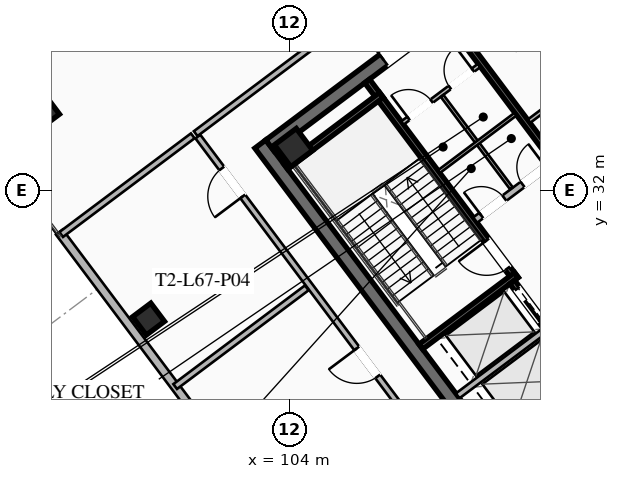
"""IFC4 building model, lengths in metres.
Left out: names, types, materials, properties, quantities, classifications, styles, units other than length and angle.
Written with IfcOpenShell. Run it as: python <this file> out.ifc"""

import sys

from ifc_helpers import new_model, si_unit, direction, frame, frame_2d, origin, origin_2d, place, context, subcontext, project, spatial, rectangle, hollow_rectangle, extrude, element, fill, save


model = new_model("IFC4")
c1 = context("Model", 3, precision=1e-05, world=origin(), true_north=direction((0.0, 1.0)))
c2 = subcontext(c1, "Body", "Model", "MODEL_VIEW")
j1 = project(units=[si_unit("LENGTHUNIT", "METRE"), si_unit("PLANEANGLEUNIT", "RADIAN")], contexts=[c1])
p1 = place(None, origin())
s1 = spatial("IfcSite", under=j1, at=p1, CompositionType="ELEMENT")
p2 = place(p1, origin())
s2 = spatial("IfcBuilding", under=s1, at=p2, CompositionType="ELEMENT")
p3 = place(p2, frame((0.0, 0.0, 246.8)))
s3 = spatial("IfcBuildingStorey", under=s2, at=p3, CompositionType="ELEMENT", Elevation=246.8)
p4 = place(p3, frame((112.396, 21.047, 0.0), z_axis=(0.0, 0.0, 1.0), x_axis=(-0.600005007985, 0.799996243986, 0.0)))
e1 = element("IfcWall", 1, at=p4, inside=s3, PredefinedType="SHEAR", context=c2, shape_type="SweptSolid", body=[
    extrude(rectangle(XDim=15.6, YDim=0.45, at=frame_2d((7.8, 0.0))), origin(), (0.0, 0.0, 1.0), 4.6),
])
p5 = place(p3, frame((103.351, 33.482, 0.0), z_axis=(0.0, 0.0, 1.0), x_axis=(0.8, 0.6, 0.0)))
e2 = element("IfcWall", 2, at=p5, inside=s3, PredefinedType="SHEAR", context=c2, shape_type="SweptSolid", body=[
    extrude(rectangle(XDim=15.26, YDim=0.45, at=frame_2d((7.63, 0.0))), origin(), (0.0, 0.0, 1.0), 4.6),
])
p6 = place(p5, frame((4.68, 0.0, 0.0)))
e3 = element("IfcOpeningElement", 3, at=p6, cuts=e2, PredefinedType="OPENING", context=c2, shape_type="SweptSolid", body=[
    extrude(rectangle(XDim=1.25, YDim=2.25, at=frame_2d((0.625, 1.125))), frame((0.0, 0.235, 0.0), z_axis=(0.0, -1.0, 0.0), x_axis=(1.0, 0.0, 0.0)), (0.0, 0.0, 1.0), 0.47),
])
p7 = place(p5, frame((9.73, 0.0, 0.0)))
e4 = element("IfcOpeningElement", 4, at=p7, cuts=e2, PredefinedType="OPENING", context=c2, shape_type="SweptSolid", body=[
    extrude(rectangle(XDim=1.25, YDim=2.25, at=frame_2d((0.625, 1.125))), frame((0.0, 0.235, 0.0), z_axis=(0.0, -1.0, 0.0), x_axis=(1.0, 0.0, 0.0)), (0.0, 0.0, 1.0), 0.47),
])
for number, where, z_axis, x_axis in (
    (5, (104.13, 33.41, 0.0), (0.0, 0.0, 1.0), (0.8, 0.6, 0.0)),
    (6, (95.8, 34.6, 0.0), (0.0, 0.0, 1.0), (0.8, 0.6, 0.0)),
):
    element("IfcColumn", number, at=place(p3, frame(where, z_axis=z_axis, x_axis=x_axis)), inside=s3, PredefinedType="COLUMN", context=c2, shape_type="SweptSolid", body=[
        extrude(hollow_rectangle(XDim=0.9, YDim=0.9, WallThickness=0.04, at=origin_2d()), origin(), (0.0, 0.0, 1.0), 4.38),
    ])
p8 = place(p3, frame((99.36, 27.77, 0.0), z_axis=(0.0, 0.0, 1.0), x_axis=(0.799999996291, 0.600000004945, 0.0)))
e7 = element("IfcColumn", 7, at=p8, inside=s3, PredefinedType="COLUMN", context=c2, shape_type="SweptSolid", body=[
    extrude(hollow_rectangle(XDim=0.75, YDim=0.75, WallThickness=0.032, at=origin_2d()), origin(), (0.0, 0.0, 1.0), 4.38),
])
p9 = place(p3, frame((107.766, 15.512, 0.0), z_axis=(0.0, 0.0, 1.0), x_axis=(-0.6, 0.8, 0.0)))
e8 = element("IfcWall", 8, at=p9, inside=s3, PredefinedType="SOLIDWALL", context=c2, shape_type="SweptSolid", body=[
    extrude(rectangle(XDim=18.9, YDim=0.28, at=frame_2d((9.45, 0.0))), origin(), (0.0, 0.0, 1.0), 4.38),
])
p10 = place(p3, frame((111.44, 29.08, 0.0), z_axis=(0.0, 0.0, 1.0), x_axis=(-0.59999041401, 0.800007189403, 0.0)))
e9 = element("IfcWall", 9, at=p10, inside=s3, PredefinedType="SHEAR", context=c2, shape_type="SweptSolid", body=[
    extrude(rectangle(XDim=8.15, YDim=0.2, at=frame_2d((4.075, 0.0))), origin(), (0.0, 0.0, 1.0), 4.38),
])
p11 = place(p10, frame((0.45, 0.0, 0.0)))
e10 = element("IfcOpeningElement", 10, at=p11, cuts=e9, PredefinedType="OPENING", context=c2, shape_type="SweptSolid", body=[
    extrude(rectangle(XDim=1.15, YDim=2.2, at=frame_2d((0.575, 1.1))), frame((0.0, 0.11, 0.0), z_axis=(0.0, -1.0, 0.0), x_axis=(1.0, 0.0, 0.0)), (0.0, 0.0, 1.0), 0.22),
])
for number, where, z_axis, x_axis in (
    (11, (108.316, 26.862, 0.0), (0.0, 0.0, 1.0), (0.8, 0.6, 0.0)),
    (12, (103.876, 32.782, 0.0), (0.0, 0.0, 1.0), (0.8, 0.6, 0.0)),
):
    element("IfcWall", number, at=place(p3, frame(where, z_axis=z_axis, x_axis=x_axis)), inside=s3, PredefinedType="SHEAR", context=c2, shape_type="SweptSolid", body=[
        extrude(rectangle(XDim=3.93, YDim=0.2, at=frame_2d((1.965, 0.0))), origin(), (0.0, 0.0, 1.0), 4.38),
    ])
p12 = place(p3, frame((118.058, 25.856, 0.0), z_axis=(0.0, 0.0, 1.0), x_axis=(-0.600002657301, 0.799998007018, 0.0)))
e13 = element("IfcWall", 13, at=p12, inside=s3, PredefinedType="SHEAR", context=c2, shape_type="SweptSolid", body=[
    extrude(rectangle(XDim=14.7, YDim=0.2, at=frame_2d((7.35, 0.0))), origin(), (0.0, 0.0, 1.0), 4.38),
])
p13 = place(p3, frame((110.104, 31.028, 0.0), z_axis=(0.0, 0.0, 1.0), x_axis=(0.800018601094, 0.59997519774, 0.0)))
e14 = element("IfcWall", 14, at=p13, inside=s3, PredefinedType="SOLIDWALL", context=c2, shape_type="SweptSolid", body=[
    extrude(rectangle(XDim=3.15, YDim=0.22, at=frame_2d((1.575, 0.0))), origin(), (0.0, 0.0, 1.0), 3.491),
])
p14 = place(p13, frame((0.25, 0.0, 0.0)))
e15 = element("IfcOpeningElement", 15, at=p14, cuts=e14, PredefinedType="OPENING", context=c2, shape_type="SweptSolid", body=[
    extrude(rectangle(XDim=0.95, YDim=2.05, at=frame_2d((0.475, 1.025))), frame((0.0, 0.12, 0.0), z_axis=(0.0, -1.0, 0.0), x_axis=(1.0, 0.0, 0.0)), (0.0, 0.0, 1.0), 0.24),
])
p15 = place(p13, frame((1.95, 0.0, 0.0)))
e16 = element("IfcOpeningElement", 16, at=p15, cuts=e14, PredefinedType="OPENING", context=c2, shape_type="SweptSolid", body=[
    extrude(rectangle(XDim=0.95, YDim=2.05, at=frame_2d((0.475, 1.025))), frame((0.0, 0.12, 0.0), z_axis=(0.0, -1.0, 0.0), x_axis=(1.0, 0.0, 0.0)), (0.0, 0.0, 1.0), 0.24),
])
p16 = place(p3, frame((115.25, 23.75, 0.0), z_axis=(0.0, 0.0, 1.0), x_axis=(-0.599994036198, 0.800004472816, 0.0)))
e17 = element("IfcWall", 17, at=p16, inside=s3, PredefinedType="SHEAR", context=c2, shape_type="SweptSolid", body=[
    extrude(rectangle(XDim=6.55, YDim=0.2, at=frame_2d((3.275, 0.0))), origin(), (0.0, 0.0, 1.0), 4.38),
])
p17 = place(p16, frame((4.975, 0.0, 0.0)))
e18 = element("IfcOpeningElement", 18, at=p17, cuts=e17, PredefinedType="OPENING", context=c2, shape_type="SweptSolid", body=[
    extrude(rectangle(XDim=1.3, YDim=2.25, at=frame_2d((0.65, 1.125))), frame((0.0, 0.11, 0.0), z_axis=(0.0, -1.0, 0.0), x_axis=(1.0, 0.0, 0.0)), (0.0, 0.0, 1.0), 0.22),
])
p18 = place(p16, frame((2.975, 0.0, 0.0)))
e19 = element("IfcOpeningElement", 19, at=p18, cuts=e17, PredefinedType="OPENING", context=c2, shape_type="SweptSolid", body=[
    extrude(rectangle(XDim=1.3, YDim=2.25, at=frame_2d((0.65, 1.125))), frame((0.0, 0.11, 0.0), z_axis=(0.0, -1.0, 0.0), x_axis=(1.0, 0.0, 0.0)), (0.0, 0.0, 1.0), 0.22),
])
p19 = place(p16, frame((0.775, 0.0, 0.0)))
e20 = element("IfcOpeningElement", 20, at=p19, cuts=e17, PredefinedType="OPENING", context=c2, shape_type="SweptSolid", body=[
    extrude(rectangle(XDim=1.3, YDim=2.25, at=frame_2d((0.65, 1.125))), frame((0.0, 0.11, 0.0), z_axis=(0.0, -1.0, 0.0), x_axis=(1.0, 0.0, 0.0)), (0.0, 0.0, 1.0), 0.22),
])
for number, where, z_axis, x_axis in (
    (21, (110.746, 23.622, 0.0), (0.0, 0.0, 1.0), (0.8, 0.6, 0.0)),
    (22, (109.528, 25.246, 0.0), (0.0, 0.0, 1.0), (0.8, 0.6, 0.0)),
):
    element("IfcWall", number, at=place(p3, frame(where, z_axis=z_axis, x_axis=x_axis)), inside=s3, PredefinedType="SOLIDWALL", context=c2, shape_type="SweptSolid", body=[
        extrude(rectangle(XDim=3.58, YDim=0.2, at=frame_2d((1.79, 0.0))), origin(), (0.0, 0.0, 1.0), 4.38),
    ])
p20 = place(p3, frame((107.71, 34.22, 0.0), z_axis=(0.0, 0.0, 1.0), x_axis=(0.799981399002, 0.60002480053, 0.0)))
e23 = element("IfcWall", 23, at=p20, inside=s3, PredefinedType="PARTITIONING", context=c2, shape_type="SweptSolid", body=[
    extrude(rectangle(XDim=3.15, YDim=0.135, at=frame_2d((1.575, 0.0))), origin(), (0.0, 0.0, 1.0), 3.491),
])
p21 = place(p20, frame((0.25, 0.0, 0.0)))
e24 = element("IfcOpeningElement", 24, at=p21, cuts=e23, PredefinedType="OPENING", context=c2, shape_type="SweptSolid", body=[
    extrude(rectangle(XDim=0.95, YDim=2.05, at=frame_2d((0.475, 1.025))), frame((0.0, 0.077, 0.0), z_axis=(0.0, -1.0, 0.0), x_axis=(1.0, 0.0, 0.0)), (0.0, 0.0, 1.0), 0.155),
])
p22 = place(p20, frame((1.95, 0.0, 0.0)))
e25 = element("IfcOpeningElement", 25, at=p22, cuts=e23, PredefinedType="OPENING", context=c2, shape_type="SweptSolid", body=[
    extrude(rectangle(XDim=0.95, YDim=2.05, at=frame_2d((0.475, 1.025))), frame((0.0, 0.077, 0.0), z_axis=(0.0, -1.0, 0.0), x_axis=(1.0, 0.0, 0.0)), (0.0, 0.0, 1.0), 0.155),
])
p23 = place(p3, frame((111.296, 32.072, 0.0), z_axis=(0.0, 0.0, 1.0), x_axis=(-0.59995887973, 0.800030838552, 0.0)))
e26 = element("IfcWall", 26, at=p23, inside=s3, PredefinedType="PARTITIONING", context=c2, shape_type="SweptSolid", body=[
    extrude(rectangle(XDim=3.8, YDim=0.11, at=frame_2d((1.9, 0.0))), origin(), (0.0, 0.0, 1.0), 3.491),
])
p24 = place(p3, frame((108.91, 32.62, 0.0), z_axis=(0.0, 0.0, 1.0), x_axis=(0.800018601094, 0.59997519774, 0.0)))
e27 = element("IfcWall", 27, at=p24, inside=s3, PredefinedType="PARTITIONING", context=c2, shape_type="SweptSolid", body=[
    extrude(rectangle(XDim=3.15, YDim=0.11, at=frame_2d((1.575, 0.0))), origin(), (0.0, 0.0, 1.0), 3.491),
])
p25 = place(p3, frame((115.11, 33.27, 0.0), z_axis=(0.0, 0.0, 1.0), x_axis=(-0.600011160345, 0.79999162962, 0.0)))
e28 = element("IfcWall", 28, at=p25, inside=s3, PredefinedType="SOLIDWALL", context=c2, shape_type="SweptSolid", body=[
    extrude(rectangle(XDim=7.0, YDim=0.2, at=frame_2d((3.5, 0.0))), origin(), (0.0, 0.0, 1.0), 3.491),
])
p26 = place(p25, frame((0.85, 0.0, 0.0)))
e29 = element("IfcOpeningElement", 29, at=p26, cuts=e28, PredefinedType="OPENING", context=c2, shape_type="SweptSolid", body=[
    extrude(rectangle(XDim=0.95, YDim=2.05, at=frame_2d((0.475, 1.025))), frame((0.0, 0.11, 0.0), z_axis=(0.0, -1.0, 0.0), x_axis=(1.0, 0.0, 0.0)), (0.0, 0.0, 1.0), 0.22),
])
p27 = place(p25, frame((4.85, 0.0, 0.0)))
e30 = element("IfcOpeningElement", 30, at=p27, cuts=e28, PredefinedType="OPENING", context=c2, shape_type="SweptSolid", body=[
    extrude(rectangle(XDim=0.95, YDim=2.05, at=frame_2d((0.475, 1.025))), frame((0.0, 0.11, 0.0), z_axis=(0.0, -1.0, 0.0), x_axis=(1.0, 0.0, 0.0)), (0.0, 0.0, 1.0), 0.22),
])
p28 = place(p3, frame((111.876, 34.282, 0.0), z_axis=(0.0, 0.0, 1.0), x_axis=(0.8, 0.6, 0.0)))
e31 = element("IfcWall", 31, at=p28, inside=s3, PredefinedType="PARTITIONING", context=c2, shape_type="SweptSolid", body=[
    extrude(rectangle(XDim=1.88, YDim=0.135, at=frame_2d((0.94, 0.0))), origin(), (0.0, 0.0, 1.0), 3.491),
])
for number, where, z_axis, x_axis in (
    (32, (100.91, 33.87, 0.0), (0.0, 0.0, 1.0), (0.8, 0.6, 0.0)),
    (33, (127.09, 30.13, 0.0), (0.0, 0.0, 1.0), (-0.8, -0.6, 0.0)),
):
    element("IfcWall", number, at=place(p3, frame(where, z_axis=z_axis, x_axis=x_axis)), inside=s3, PredefinedType="SOLIDWALL", context=c2, shape_type="SweptSolid", body=[
        extrude(rectangle(XDim=18.7, YDim=0.2, at=frame_2d((9.35, 0.0))), origin(), (0.0, 0.0, 1.0), 3.491),
    ])
p29 = place(p3, frame((112.058, 19.006, 0.0), z_axis=(0.0, 0.0, 1.0), x_axis=(-0.600010580279, 0.799992064682, 0.0)))
e34 = element("IfcWall", 34, at=p29, inside=s3, PredefinedType="SOLIDWALL", context=c2, shape_type="SweptSolid", body=[
    extrude(rectangle(XDim=18.46, YDim=0.2, at=frame_2d((9.23, 0.0))), origin(), (0.0, 0.0, 1.0), 3.491),
])
p30 = place(p29, frame((2.2, 0.0, 0.0)))
e35 = element("IfcOpeningElement", 35, at=p30, cuts=e34, PredefinedType="OPENING", context=c2, shape_type="SweptSolid", body=[
    extrude(rectangle(XDim=1.25, YDim=2.25, at=frame_2d((0.625, 1.125))), frame((0.0, 0.11, 0.0), z_axis=(0.0, -1.0, 0.0), x_axis=(1.0, 0.0, 0.0)), (0.0, 0.0, 1.0), 0.22),
])
p31 = place(p29, frame((8.6, 0.0, 0.0)))
e36 = element("IfcOpeningElement", 36, at=p31, cuts=e34, PredefinedType="OPENING", context=c2, shape_type="SweptSolid", body=[
    extrude(rectangle(XDim=1.15, YDim=2.2, at=frame_2d((0.575, 1.1))), frame((0.0, 0.11, 0.0), z_axis=(0.0, -1.0, 0.0), x_axis=(1.0, 0.0, 0.0)), (0.0, 0.0, 1.0), 0.22),
])
p32 = place(p29, frame((16.0, 0.0, 0.0)))
e37 = element("IfcOpeningElement", 37, at=p32, cuts=e34, PredefinedType="OPENING", context=c2, shape_type="SweptSolid", body=[
    extrude(rectangle(XDim=1.15, YDim=2.2, at=frame_2d((0.575, 1.1))), frame((0.0, 0.11, 0.0), z_axis=(0.0, -1.0, 0.0), x_axis=(1.0, 0.0, 0.0)), (0.0, 0.0, 1.0), 0.22),
])
for number, where, z_axis, x_axis in (
    (38, (96.486, 30.552, 0.0), (0.0, 0.0, 1.0), (0.8, 0.6, 0.0)),
    (39, (100.236, 25.552, 0.0), (0.0, 0.0, 1.0), (0.8, 0.6, 0.0)),
):
    element("IfcWall", number, at=place(p3, frame(where, z_axis=z_axis, x_axis=x_axis)), inside=s3, PredefinedType="SOLIDWALL", context=c2, shape_type="SweptSolid", body=[
        extrude(rectangle(XDim=5.41, YDim=0.2, at=frame_2d((2.705, 0.0))), origin(), (0.0, 0.0, 1.0), 3.491),
    ])
p33 = place(p6, origin())
e40 = element("IfcDoor", 40, at=p33, inside=s3, OperationType="SINGLE_SWING_LEFT", PredefinedType="DOOR", context=c2, shape_type="SweptSolid", body=[
    extrude(rectangle(XDim=1.25, YDim=2.25, at=frame_2d((0.625, 1.125))), frame((0.0, 0.025, 0.0), z_axis=(0.0, -1.0, 0.0), x_axis=(1.0, 0.0, 0.0)), (0.0, 0.0, 1.0), 0.05),
])
fill(e3, e40)
p34 = place(p11, origin())
e41 = element("IfcDoor", 41, at=p34, inside=s3, OperationType="SINGLE_SWING_RIGHT", PredefinedType="DOOR", context=c2, shape_type="SweptSolid", body=[
    extrude(rectangle(XDim=1.15, YDim=2.2, at=frame_2d((0.575, 1.1))), frame((0.0, 0.025, 0.0), z_axis=(0.0, -1.0, 0.0), x_axis=(1.0, 0.0, 0.0)), (0.0, 0.0, 1.0), 0.05),
])
fill(e10, e41)
p35 = place(p21, origin())
e42 = element("IfcDoor", 42, at=p35, inside=s3, OperationType="SINGLE_SWING_LEFT", PredefinedType="DOOR", context=c2, shape_type="SweptSolid", body=[
    extrude(rectangle(XDim=0.95, YDim=2.05, at=frame_2d((0.475, 1.025))), frame((0.0, 0.025, 0.0), z_axis=(0.0, -1.0, 0.0), x_axis=(1.0, 0.0, 0.0)), (0.0, 0.0, 1.0), 0.05),
])
fill(e24, e42)
p36 = place(p22, origin())
e43 = element("IfcDoor", 43, at=p36, inside=s3, OperationType="SINGLE_SWING_RIGHT", PredefinedType="DOOR", context=c2, shape_type="SweptSolid", body=[
    extrude(rectangle(XDim=0.95, YDim=2.05, at=frame_2d((0.475, 1.025))), frame((0.0, 0.025, 0.0), z_axis=(0.0, -1.0, 0.0), x_axis=(1.0, 0.0, 0.0)), (0.0, 0.0, 1.0), 0.05),
])
fill(e25, e43)
p37 = place(p14, origin())
e44 = element("IfcDoor", 44, at=p37, inside=s3, OperationType="SINGLE_SWING_LEFT", PredefinedType="DOOR", context=c2, shape_type="SweptSolid", body=[
    extrude(rectangle(XDim=0.95, YDim=2.05, at=frame_2d((0.475, 1.025))), frame((0.0, 0.025, 0.0), z_axis=(0.0, -1.0, 0.0), x_axis=(1.0, 0.0, 0.0)), (0.0, 0.0, 1.0), 0.05),
])
fill(e15, e44)
p38 = place(p15, origin())
e45 = element("IfcDoor", 45, at=p38, inside=s3, OperationType="SINGLE_SWING_RIGHT", PredefinedType="DOOR", context=c2, shape_type="SweptSolid", body=[
    extrude(rectangle(XDim=0.95, YDim=2.05, at=frame_2d((0.475, 1.025))), frame((0.0, 0.025, 0.0), z_axis=(0.0, -1.0, 0.0), x_axis=(1.0, 0.0, 0.0)), (0.0, 0.0, 1.0), 0.05),
])
fill(e16, e45)
p39 = place(p31, origin())
e46 = element("IfcDoor", 46, at=p39, inside=s3, OperationType="SINGLE_SWING_RIGHT", PredefinedType="DOOR", context=c2, shape_type="SweptSolid", body=[
    extrude(rectangle(XDim=1.15, YDim=2.2, at=frame_2d((0.575, 1.1))), frame((0.0, 0.025, 0.0), z_axis=(0.0, -1.0, 0.0), x_axis=(1.0, 0.0, 0.0)), (0.0, 0.0, 1.0), 0.05),
])
fill(e36, e46)
p40 = place(p32, origin())
e47 = element("IfcDoor", 47, at=p40, inside=s3, OperationType="SINGLE_SWING_LEFT", PredefinedType="DOOR", context=c2, shape_type="SweptSolid", body=[
    extrude(rectangle(XDim=1.15, YDim=2.2, at=frame_2d((0.575, 1.1))), frame((0.0, 0.025, 0.0), z_axis=(0.0, -1.0, 0.0), x_axis=(1.0, 0.0, 0.0)), (0.0, 0.0, 1.0), 0.05),
])
fill(e37, e47)
p41 = place(p17, origin())
e48 = element("IfcDoor", 48, at=p41, inside=s3, OperationType="SLIDING_TO_LEFT", PredefinedType="DOOR", context=c2, shape_type="SweptSolid", body=[
    extrude(rectangle(XDim=1.3, YDim=2.25, at=frame_2d((0.65, 1.125))), frame((0.0, 0.025, 0.0), z_axis=(0.0, -1.0, 0.0), x_axis=(1.0, 0.0, 0.0)), (0.0, 0.0, 1.0), 0.05),
])
fill(e18, e48)
save(model, sys.argv[1])
